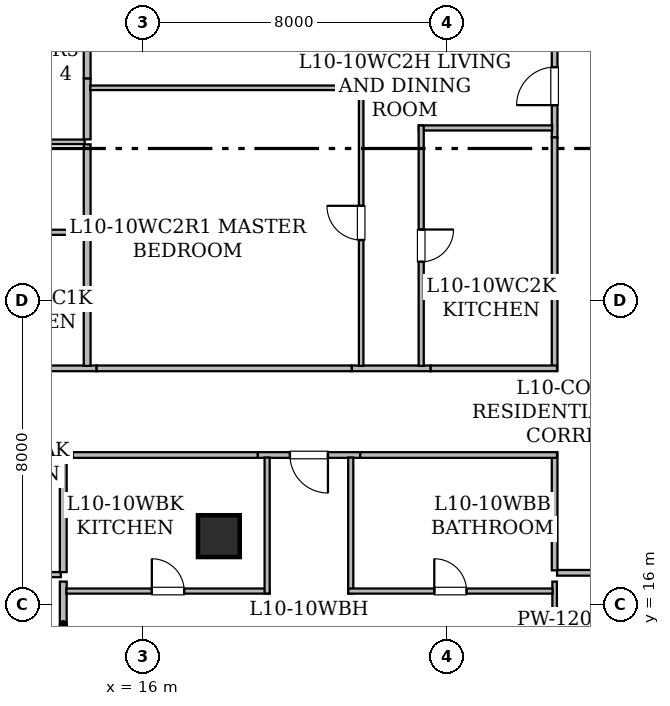
"""IFC4 building model, lengths in metres.
Left out: names, types, materials, properties, quantities, classifications, styles, units other than length and angle.
Written with IfcOpenShell. Run it as: python <this file> out.ifc"""

import sys

from ifc_helpers import new_model, si_unit, direction, frame, frame_2d, origin, origin_2d, place, context, subcontext, project, spatial, rectangle, hollow_rectangle, extrude, element, fill, save


model = new_model("IFC4")
c1 = context("Model", 3, precision=1e-05, world=origin(), true_north=direction((0.0, 1.0)))
c2 = subcontext(c1, "Body", "Model", "MODEL_VIEW")
j1 = project(units=[si_unit("LENGTHUNIT", "METRE"), si_unit("PLANEANGLEUNIT", "RADIAN")], contexts=[c1])
p1 = place(None, origin())
s1 = spatial("IfcSite", under=j1, at=p1, CompositionType="ELEMENT")
p2 = place(p1, origin())
s2 = spatial("IfcBuilding", under=s1, at=p2, CompositionType="ELEMENT")
p3 = place(p2, frame((0.0, 0.0, 44.25)))
s3 = spatial("IfcBuildingStorey", under=s2, at=p3, CompositionType="ELEMENT", Elevation=44.25)
p4 = place(p3, frame((18.0, 17.8, 0.0), z_axis=(0.0, 0.0, 1.0), x_axis=(1.0, 0.0, 0.0)))
e1 = element("IfcColumn", 1, at=p4, inside=s3, PredefinedType="COLUMN", context=c2, shape_type="SweptSolid", body=[
    extrude(hollow_rectangle(XDim=1.1, YDim=1.1, WallThickness=0.055, at=origin_2d()), origin(), (0.0, 0.0, 1.0), 3.65),
])
p5 = place(p3, frame((34.114, 16.835, 0.0), z_axis=(0.0, 0.0, 1.0), x_axis=(-1.0, 0.0, 0.0)))
e2 = element("IfcWall", 2, at=p5, inside=s3, PredefinedType="STANDARD", context=c2, shape_type="SweptSolid", body=[
    extrude(rectangle(XDim=7.214, YDim=0.15, at=frame_2d((3.607, 0.0))), origin(), (0.0, 0.0, 1.0), 2.647),
])
p6 = place(p5, frame((3.053, 0.0, 0.0)))
e3 = element("IfcOpeningElement", 3, at=p6, cuts=e2, PredefinedType="OPENING", context=c2, shape_type="SweptSolid", body=[
    extrude(rectangle(XDim=1.15, YDim=2.2, at=frame_2d((0.575, 1.1))), frame((0.0, 0.085, 0.0), z_axis=(0.0, -1.0, 0.0), x_axis=(1.0, 0.0, 0.0)), (0.0, 0.0, 1.0), 0.17),
])
p7 = place(p3, frame((14.154, 19.935, 0.0), z_axis=(0.0, 0.0, 1.0), x_axis=(-1.0, 0.0, 0.0)))
e4 = element("IfcWall", 4, at=p7, inside=s3, PredefinedType="STANDARD", context=c2, shape_type="SweptSolid", body=[
    extrude(rectangle(XDim=3.83, YDim=0.15, at=frame_2d((1.915, 0.0))), origin(), (0.0, 0.0, 1.0), 3.43),
])
p8 = place(p3, frame((21.719, 19.935, 0.0), z_axis=(0.0, 0.0, 1.0), x_axis=(-1.0, 0.0, 0.0)))
e5 = element("IfcWall", 5, at=p8, inside=s3, PredefinedType="STANDARD", context=c2, shape_type="SweptSolid", body=[
    extrude(rectangle(XDim=2.698, YDim=0.15, at=frame_2d((1.349, 0.0))), origin(), (0.0, 0.0, 1.0), 3.43),
])
p9 = place(p8, frame((0.849, 0.0, 0.0)))
e6 = element("IfcOpeningElement", 6, at=p9, cuts=e5, PredefinedType="OPENING", context=c2, shape_type="SweptSolid", body=[
    extrude(rectangle(XDim=1.0, YDim=2.15, at=frame_2d((0.5, 1.075))), frame((0.0, 0.085, 0.0), z_axis=(0.0, -1.0, 0.0), x_axis=(1.0, 0.0, 0.0)), (0.0, 0.0, 1.0), 0.17),
])
p10 = place(p3, frame((26.835, 16.9, 0.0), z_axis=(0.0, 0.0, 1.0), x_axis=(0.0, 1.0, 0.0)))
e7 = element("IfcWall", 7, at=p10, inside=s3, PredefinedType="STANDARD", context=c2, shape_type="SweptSolid", body=[
    extrude(rectangle(XDim=3.1, YDim=0.15, at=frame_2d((1.55, 0.0))), origin(), (0.0, 0.0, 1.0), 2.647),
])
p11 = place(p3, frame((26.898, 19.935, 0.0), z_axis=(0.0, 0.0, 1.0), x_axis=(-1.0, 0.0, 0.0)))
e8 = element("IfcWall", 8, at=p11, inside=s3, PredefinedType="STANDARD", context=c2, shape_type="SweptSolid", body=[
    extrude(rectangle(XDim=5.179, YDim=0.15, at=frame_2d((2.589, 0.0))), origin(), (0.0, 0.0, 1.0), 3.43),
])
p12 = place(p3, frame((19.021, 19.935, 0.0), z_axis=(0.0, 0.0, 1.0), x_axis=(-1.0, 0.0, 0.0)))
e9 = element("IfcWall", 9, at=p12, inside=s3, PredefinedType="STANDARD", context=c2, shape_type="SweptSolid", body=[
    extrude(rectangle(XDim=4.867, YDim=0.15, at=frame_2d((2.434, 0.0))), origin(), (0.0, 0.0, 1.0), 2.647),
])
p13 = place(p3, frame((10.638, 22.215, 0.0), z_axis=(0.0, 0.0, 1.0), x_axis=(1.0, 0.0, 0.0)))
e10 = element("IfcWall", 10, at=p13, inside=s3, PredefinedType="STANDARD", context=c2, shape_type="SweptSolid", body=[
    extrude(rectangle(XDim=4.145, YDim=0.15, at=frame_2d((2.073, 0.0))), origin(), (0.0, 0.0, 1.0), 3.43),
])
p14 = place(p3, frame((26.835, 28.292, 0.0), z_axis=(0.0, 0.0, 1.0), x_axis=(0.0, 1.0, 0.0)))
e11 = element("IfcWall", 11, at=p14, inside=s3, PredefinedType="STANDARD", context=c2, shape_type="SweptSolid", body=[
    extrude(rectangle(XDim=2.698, YDim=0.15, at=frame_2d((1.349, 0.0))), origin(), (0.0, 0.0, 1.0), 3.43),
])
p15 = place(p14, frame((0.849, 0.0, 0.0)))
e12 = element("IfcOpeningElement", 12, at=p15, cuts=e11, PredefinedType="OPENING", context=c2, shape_type="SweptSolid", body=[
    extrude(rectangle(XDim=1.0, YDim=2.15, at=frame_2d((0.5, 1.075))), frame((0.0, 0.085, 0.0), z_axis=(0.0, -1.0, 0.0), x_axis=(1.0, 0.0, 0.0)), (0.0, 0.0, 1.0), 0.17),
])
p16 = place(p3, frame((21.495, 22.215, 0.0), z_axis=(0.0, 0.0, 1.0), x_axis=(1.0, 0.0, 0.0)))
e13 = element("IfcWall", 13, at=p16, inside=s3, PredefinedType="STANDARD", context=c2, shape_type="SweptSolid", body=[
    extrude(rectangle(XDim=2.078, YDim=0.15, at=frame_2d((1.039, 0.0))), origin(), (0.0, 0.0, 1.0), 3.43),
])
p17 = place(p3, frame((26.835, 22.15, 0.0), z_axis=(0.0, 0.0, 1.0), x_axis=(0.0, 1.0, 0.0)))
e14 = element("IfcWall", 14, at=p17, inside=s3, PredefinedType="STANDARD", context=c2, shape_type="SweptSolid", body=[
    extrude(rectangle(XDim=6.142, YDim=0.15, at=frame_2d((3.071, 0.0))), origin(), (0.0, 0.0, 1.0), 2.957),
])
p18 = place(p3, frame((23.573, 22.215, 0.0), z_axis=(0.0, 0.0, 1.0), x_axis=(1.0, 0.0, 0.0)))
e15 = element("IfcWall", 15, at=p18, inside=s3, PredefinedType="STANDARD", context=c2, shape_type="SweptSolid", body=[
    extrude(rectangle(XDim=3.325, YDim=0.15, at=frame_2d((1.663, 0.0))), origin(), (0.0, 0.0, 1.0), 3.43),
])
p19 = place(p3, frame((14.783, 22.215, 0.0), z_axis=(0.0, 0.0, 1.0), x_axis=(1.0, 0.0, 0.0)))
e16 = element("IfcWall", 16, at=p19, inside=s3, PredefinedType="STANDARD", context=c2, shape_type="SweptSolid", body=[
    extrude(rectangle(XDim=6.712, YDim=0.15, at=frame_2d((3.356, 0.0))), origin(), (0.0, 0.0, 1.0), 2.647),
])
p20 = place(p3, frame((26.835, 14.526, 0.0), z_axis=(0.0, 0.0, 1.0), x_axis=(0.0, 1.0, 0.0)))
e17 = element("IfcWall", 17, at=p20, inside=s3, PredefinedType="PARTITIONING", context=c2, shape_type="SweptSolid", body=[
    extrude(rectangle(XDim=2.078, YDim=0.12, at=frame_2d((1.039, 0.0))), origin(), (0.0, 0.0, 1.0), 3.43),
])
p21 = place(p3, frame((10.01, 16.788, 0.0), z_axis=(0.0, 0.0, 1.0), x_axis=(1.0, 0.0, 0.0)))
e18 = element("IfcWall", 18, at=p21, inside=s3, PredefinedType="PARTITIONING", context=c2, shape_type="SweptSolid", body=[
    extrude(rectangle(XDim=3.83, YDim=0.135, at=frame_2d((1.915, 0.0))), origin(), (0.0, 0.0, 1.0), 2.647),
])
p22 = place(p21, frame((1.49, 0.0, 0.0)))
e19 = element("IfcOpeningElement", 19, at=p22, cuts=e18, PredefinedType="OPENING", context=c2, shape_type="SweptSolid", body=[
    extrude(rectangle(XDim=0.85, YDim=2.1, at=frame_2d((0.425, 1.05))), frame((0.0, 0.077, 0.0), z_axis=(0.0, -1.0, 0.0), x_axis=(1.0, 0.0, 0.0)), (0.0, 0.0, 1.0), 0.155),
])
p23 = place(p3, frame((13.905, 16.604, 0.0), z_axis=(0.0, 0.0, 1.0), x_axis=(0.0, -1.0, 0.0)))
e20 = element("IfcWall", 20, at=p23, inside=s3, PredefinedType="STANDARD", context=c2, shape_type="SweptSolid", body=[
    extrude(rectangle(XDim=1.331, YDim=0.18, at=frame_2d((0.666, 0.0))), origin(), (0.0, 0.0, 1.0), 3.43),
])
p24 = place(p3, frame((13.905, 19.868, 0.0), z_axis=(0.0, 0.0, 1.0), x_axis=(0.0, -1.0, 0.0)))
e21 = element("IfcWall", 21, at=p24, inside=s3, PredefinedType="STANDARD", context=c2, shape_type="SweptSolid", body=[
    extrude(rectangle(XDim=3.015, YDim=0.18, at=frame_2d((1.507, 0.0))), origin(), (0.0, 0.0, 1.0), 2.647),
])
p25 = place(p3, frame((21.47, 19.868, 0.0), z_axis=(0.0, 0.0, 1.0), x_axis=(0.0, -1.0, 0.0)))
e22 = element("IfcWall", 22, at=p25, inside=s3, PredefinedType="PARTITIONING", context=c2, shape_type="SweptSolid", body=[
    extrude(rectangle(XDim=3.578, YDim=0.135, at=frame_2d((1.789, 0.0))), origin(), (0.0, 0.0, 1.0), 2.647),
])
p26 = place(p3, frame((21.405, 16.355, 0.0), z_axis=(0.0, 0.0, 1.0), x_axis=(1.0, 0.0, 0.0)))
e23 = element("IfcWall", 23, at=p26, inside=s3, PredefinedType="PARTITIONING", context=c2, shape_type="SweptSolid", body=[
    extrude(rectangle(XDim=5.376, YDim=0.135, at=frame_2d((2.688, 0.0))), origin(), (0.0, 0.0, 1.0), 3.43),
])
p27 = place(p26, frame((2.263, 0.0, 0.0)))
e24 = element("IfcOpeningElement", 24, at=p27, cuts=e23, PredefinedType="OPENING", context=c2, shape_type="SweptSolid", body=[
    extrude(rectangle(XDim=0.85, YDim=2.1, at=frame_2d((0.425, 1.05))), frame((0.0, 0.077, 0.0), z_axis=(0.0, -1.0, 0.0), x_axis=(1.0, 0.0, 0.0)), (0.0, 0.0, 1.0), 0.155),
])
p28 = place(p3, frame((13.987, 16.355, 0.0), z_axis=(0.0, 0.0, 1.0), x_axis=(1.0, 0.0, 0.0)))
e25 = element("IfcWall", 25, at=p28, inside=s3, PredefinedType="PARTITIONING", context=c2, shape_type="SweptSolid", body=[
    extrude(rectangle(XDim=5.348, YDim=0.135, at=frame_2d((2.674, 0.0))), origin(), (0.0, 0.0, 1.0), 2.647),
])
p29 = place(p28, frame((2.249, 0.0, 0.0)))
e26 = element("IfcOpeningElement", 26, at=p29, cuts=e25, PredefinedType="OPENING", context=c2, shape_type="SweptSolid", body=[
    extrude(rectangle(XDim=0.85, YDim=2.1, at=frame_2d((0.425, 1.05))), frame((0.0, 0.077, 0.0), z_axis=(0.0, -1.0, 0.0), x_axis=(1.0, 0.0, 0.0)), (0.0, 0.0, 1.0), 0.155),
])
p30 = place(p3, frame((19.27, 16.29, 0.0), z_axis=(0.0, 0.0, 1.0), x_axis=(0.0, 1.0, 0.0)))
e27 = element("IfcWall", 27, at=p30, inside=s3, PredefinedType="PARTITIONING", context=c2, shape_type="SweptSolid", body=[
    extrude(rectangle(XDim=3.578, YDim=0.135, at=frame_2d((1.789, 0.0))), origin(), (0.0, 0.0, 1.0), 2.647),
])
p31 = place(p3, frame((14.469, 25.795, 0.0), z_axis=(0.0, 0.0, 1.0), x_axis=(-1.0, 0.0, 0.0)))
e28 = element("IfcWall", 28, at=p31, inside=s3, PredefinedType="PARTITIONING", context=c2, shape_type="SweptSolid", body=[
    extrude(rectangle(XDim=4.145, YDim=0.135, at=frame_2d((2.073, 0.0))), origin(), (0.0, 0.0, 1.0), 3.43),
])
p32 = place(p31, frame((1.647, 0.0, 0.0)))
e29 = element("IfcOpeningElement", 29, at=p32, cuts=e28, PredefinedType="OPENING", context=c2, shape_type="SweptSolid", body=[
    extrude(rectangle(XDim=0.85, YDim=2.1, at=frame_2d((0.425, 1.05))), frame((0.0, 0.077, 0.0), z_axis=(0.0, -1.0, 0.0), x_axis=(1.0, 0.0, 0.0)), (0.0, 0.0, 1.0), 0.155),
])
p33 = place(p3, frame((11.169, 28.175, 0.0), z_axis=(0.0, 0.0, 1.0), x_axis=(1.0, 0.0, 0.0)))
e30 = element("IfcWall", 30, at=p33, inside=s3, PredefinedType="PARTITIONING", context=c2, shape_type="SweptSolid", body=[
    extrude(rectangle(XDim=3.3, YDim=0.12, at=frame_2d((1.65, 0.0))), origin(), (0.0, 0.0, 1.0), 3.43),
])
p34 = place(p3, frame((14.534, 28.11, 0.0), z_axis=(0.0, 0.0, 1.0), x_axis=(0.0, -1.0, 0.0)))
e31 = element("IfcWall", 31, at=p34, inside=s3, PredefinedType="STANDARD", context=c2, shape_type="SweptSolid", body=[
    extrude(rectangle(XDim=2.25, YDim=0.18, at=frame_2d((1.125, 0.0))), origin(), (0.0, 0.0, 1.0), 3.43),
])
p35 = place(p3, frame((14.534, 25.73, 0.0), z_axis=(0.0, 0.0, 1.0), x_axis=(0.0, -1.0, 0.0)))
e32 = element("IfcWall", 32, at=p35, inside=s3, PredefinedType="STANDARD", context=c2, shape_type="SweptSolid", body=[
    extrude(rectangle(XDim=3.45, YDim=0.18, at=frame_2d((1.725, 0.0))), origin(), (0.0, 0.0, 1.0), 2.957),
])
p36 = place(p3, frame((14.534, 29.846, 0.0), z_axis=(0.0, 0.0, 1.0), x_axis=(0.0, -1.0, 0.0)))
e33 = element("IfcWall", 33, at=p36, inside=s3, PredefinedType="STANDARD", context=c2, shape_type="SweptSolid", body=[
    extrude(rectangle(XDim=1.606, YDim=0.18, at=frame_2d((0.803, 0.0))), origin(), (0.0, 0.0, 1.0), 3.43),
])
p37 = place(p3, frame((14.534, 34.176, 0.0), z_axis=(0.0, 0.0, 1.0), x_axis=(0.0, -1.0, 0.0)))
e34 = element("IfcWall", 34, at=p37, inside=s3, PredefinedType="STANDARD", context=c2, shape_type="SweptSolid", body=[
    extrude(rectangle(XDim=4.33, YDim=0.18, at=frame_2d((2.165, 0.0))), origin(), (0.0, 0.0, 1.0), 3.43),
])
p38 = place(p3, frame((26.77, 28.541, 0.0), z_axis=(0.0, 0.0, 1.0), x_axis=(-1.0, 0.0, 0.0)))
e35 = element("IfcWall", 35, at=p38, inside=s3, PredefinedType="PARTITIONING", context=c2, shape_type="SweptSolid", body=[
    extrude(rectangle(XDim=3.511, YDim=0.135, at=frame_2d((1.755, 0.0))), origin(), (0.0, 0.0, 1.0), 3.43),
])
p39 = place(p3, frame((23.324, 28.606, 0.0), z_axis=(0.0, 0.0, 1.0), x_axis=(0.0, -1.0, 0.0)))
e36 = element("IfcWall", 36, at=p39, inside=s3, PredefinedType="PARTITIONING", context=c2, shape_type="SweptSolid", body=[
    extrude(rectangle(XDim=6.326, YDim=0.135, at=frame_2d((3.163, 0.0))), origin(), (0.0, 0.0, 1.0), 2.957),
])
p40 = place(p39, frame((2.738, 0.0, 0.0)))
e37 = element("IfcOpeningElement", 37, at=p40, cuts=e36, PredefinedType="OPENING", context=c2, shape_type="SweptSolid", body=[
    extrude(rectangle(XDim=0.85, YDim=2.1, at=frame_2d((0.425, 1.05))), frame((0.0, 0.077, 0.0), z_axis=(0.0, -1.0, 0.0), x_axis=(1.0, 0.0, 0.0)), (0.0, 0.0, 1.0), 0.155),
])
p41 = place(p3, frame((21.744, 22.28, 0.0), z_axis=(0.0, 0.0, 1.0), x_axis=(0.0, 1.0, 0.0)))
e38 = element("IfcWall", 38, at=p41, inside=s3, PredefinedType="PARTITIONING", context=c2, shape_type="SweptSolid", body=[
    extrude(rectangle(XDim=7.566, YDim=0.12, at=frame_2d((3.783, 0.0))), origin(), (0.0, 0.0, 1.0), 2.957),
])
p42 = place(p41, frame((3.312, 0.0, 0.0)))
e39 = element("IfcOpeningElement", 39, at=p42, cuts=e38, PredefinedType="OPENING", context=c2, shape_type="SweptSolid", body=[
    extrude(rectangle(XDim=0.9, YDim=2.1, at=frame_2d((0.45, 1.05))), frame((0.0, 0.07, 0.0), z_axis=(0.0, -1.0, 0.0), x_axis=(1.0, 0.0, 0.0)), (0.0, 0.0, 1.0), 0.14),
])
p43 = place(p3, frame((21.744, 29.846, 0.0), z_axis=(0.0, 0.0, 1.0), x_axis=(0.0, 1.0, 0.0)))
e40 = element("IfcWall", 40, at=p43, inside=s3, PredefinedType="PARTITIONING", context=c2, shape_type="SweptSolid", body=[
    extrude(rectangle(XDim=4.33, YDim=0.12, at=frame_2d((2.165, 0.0))), origin(), (0.0, 0.0, 1.0), 3.43),
])
p44 = place(p43, frame((1.694, 0.0, 0.0)))
e41 = element("IfcOpeningElement", 41, at=p44, cuts=e40, PredefinedType="OPENING", context=c2, shape_type="SweptSolid", body=[
    extrude(rectangle(XDim=0.9, YDim=2.1, at=frame_2d((0.45, 1.05))), frame((0.0, 0.07, 0.0), z_axis=(0.0, -1.0, 0.0), x_axis=(1.0, 0.0, 0.0)), (0.0, 0.0, 1.0), 0.14),
])
p45 = place(p3, frame((14.616, 29.597, 0.0), z_axis=(0.0, 0.0, 1.0), x_axis=(1.0, 0.0, 0.0)))
e42 = element("IfcWall", 42, at=p45, inside=s3, PredefinedType="PARTITIONING", context=c2, shape_type="SweptSolid", body=[
    extrude(rectangle(XDim=7.074, YDim=0.12, at=frame_2d((3.537, 0.0))), origin(), (0.0, 0.0, 1.0), 2.647),
])
p46 = place(p9, origin())
e43 = element("IfcDoor", 43, at=p46, inside=s3, OperationType="SINGLE_SWING_LEFT", PredefinedType="DOOR", context=c2, shape_type="SweptSolid", body=[
    extrude(rectangle(XDim=1.0, YDim=2.15, at=frame_2d((0.5, 1.075))), frame((0.0, 0.025, 0.0), z_axis=(0.0, -1.0, 0.0), x_axis=(1.0, 0.0, 0.0)), (0.0, 0.0, 1.0), 0.05),
])
fill(e6, e43)
p47 = place(p15, origin())
e44 = element("IfcDoor", 44, at=p47, inside=s3, OperationType="SINGLE_SWING_LEFT", PredefinedType="DOOR", context=c2, shape_type="SweptSolid", body=[
    extrude(rectangle(XDim=1.0, YDim=2.15, at=frame_2d((0.5, 1.075))), frame((0.0, 0.025, 0.0), z_axis=(0.0, -1.0, 0.0), x_axis=(1.0, 0.0, 0.0)), (0.0, 0.0, 1.0), 0.05),
])
fill(e12, e44)
p48 = place(p27, origin())
e45 = element("IfcDoor", 45, at=p48, inside=s3, OperationType="SINGLE_SWING_LEFT", PredefinedType="DOOR", context=c2, shape_type="SweptSolid", body=[
    extrude(rectangle(XDim=0.85, YDim=2.1, at=frame_2d((0.425, 1.05))), frame((0.0, 0.025, 0.0), z_axis=(0.0, -1.0, 0.0), x_axis=(1.0, 0.0, 0.0)), (0.0, 0.0, 1.0), 0.05),
])
fill(e24, e45)
p49 = place(p29, origin())
e46 = element("IfcDoor", 46, at=p49, inside=s3, OperationType="SINGLE_SWING_LEFT", PredefinedType="DOOR", context=c2, shape_type="SweptSolid", body=[
    extrude(rectangle(XDim=0.85, YDim=2.1, at=frame_2d((0.425, 1.05))), frame((0.0, 0.025, 0.0), z_axis=(0.0, -1.0, 0.0), x_axis=(1.0, 0.0, 0.0)), (0.0, 0.0, 1.0), 0.05),
])
fill(e26, e46)
p50 = place(p40, origin())
e47 = element("IfcDoor", 47, at=p50, inside=s3, OperationType="SINGLE_SWING_LEFT", PredefinedType="DOOR", context=c2, shape_type="SweptSolid", body=[
    extrude(rectangle(XDim=0.85, YDim=2.1, at=frame_2d((0.425, 1.05))), frame((0.0, 0.025, 0.0), z_axis=(0.0, -1.0, 0.0), x_axis=(1.0, 0.0, 0.0)), (0.0, 0.0, 1.0), 0.05),
])
fill(e37, e47)
p51 = place(p42, origin())
e48 = element("IfcDoor", 48, at=p51, inside=s3, OperationType="SINGLE_SWING_RIGHT", PredefinedType="DOOR", context=c2, shape_type="SweptSolid", body=[
    extrude(rectangle(XDim=0.9, YDim=2.1, at=frame_2d((0.45, 1.05))), frame((0.0, 0.025, 0.0), z_axis=(0.0, -1.0, 0.0), x_axis=(1.0, 0.0, 0.0)), (0.0, 0.0, 1.0), 0.05),
])
fill(e39, e48)
save(model, sys.argv[1])
